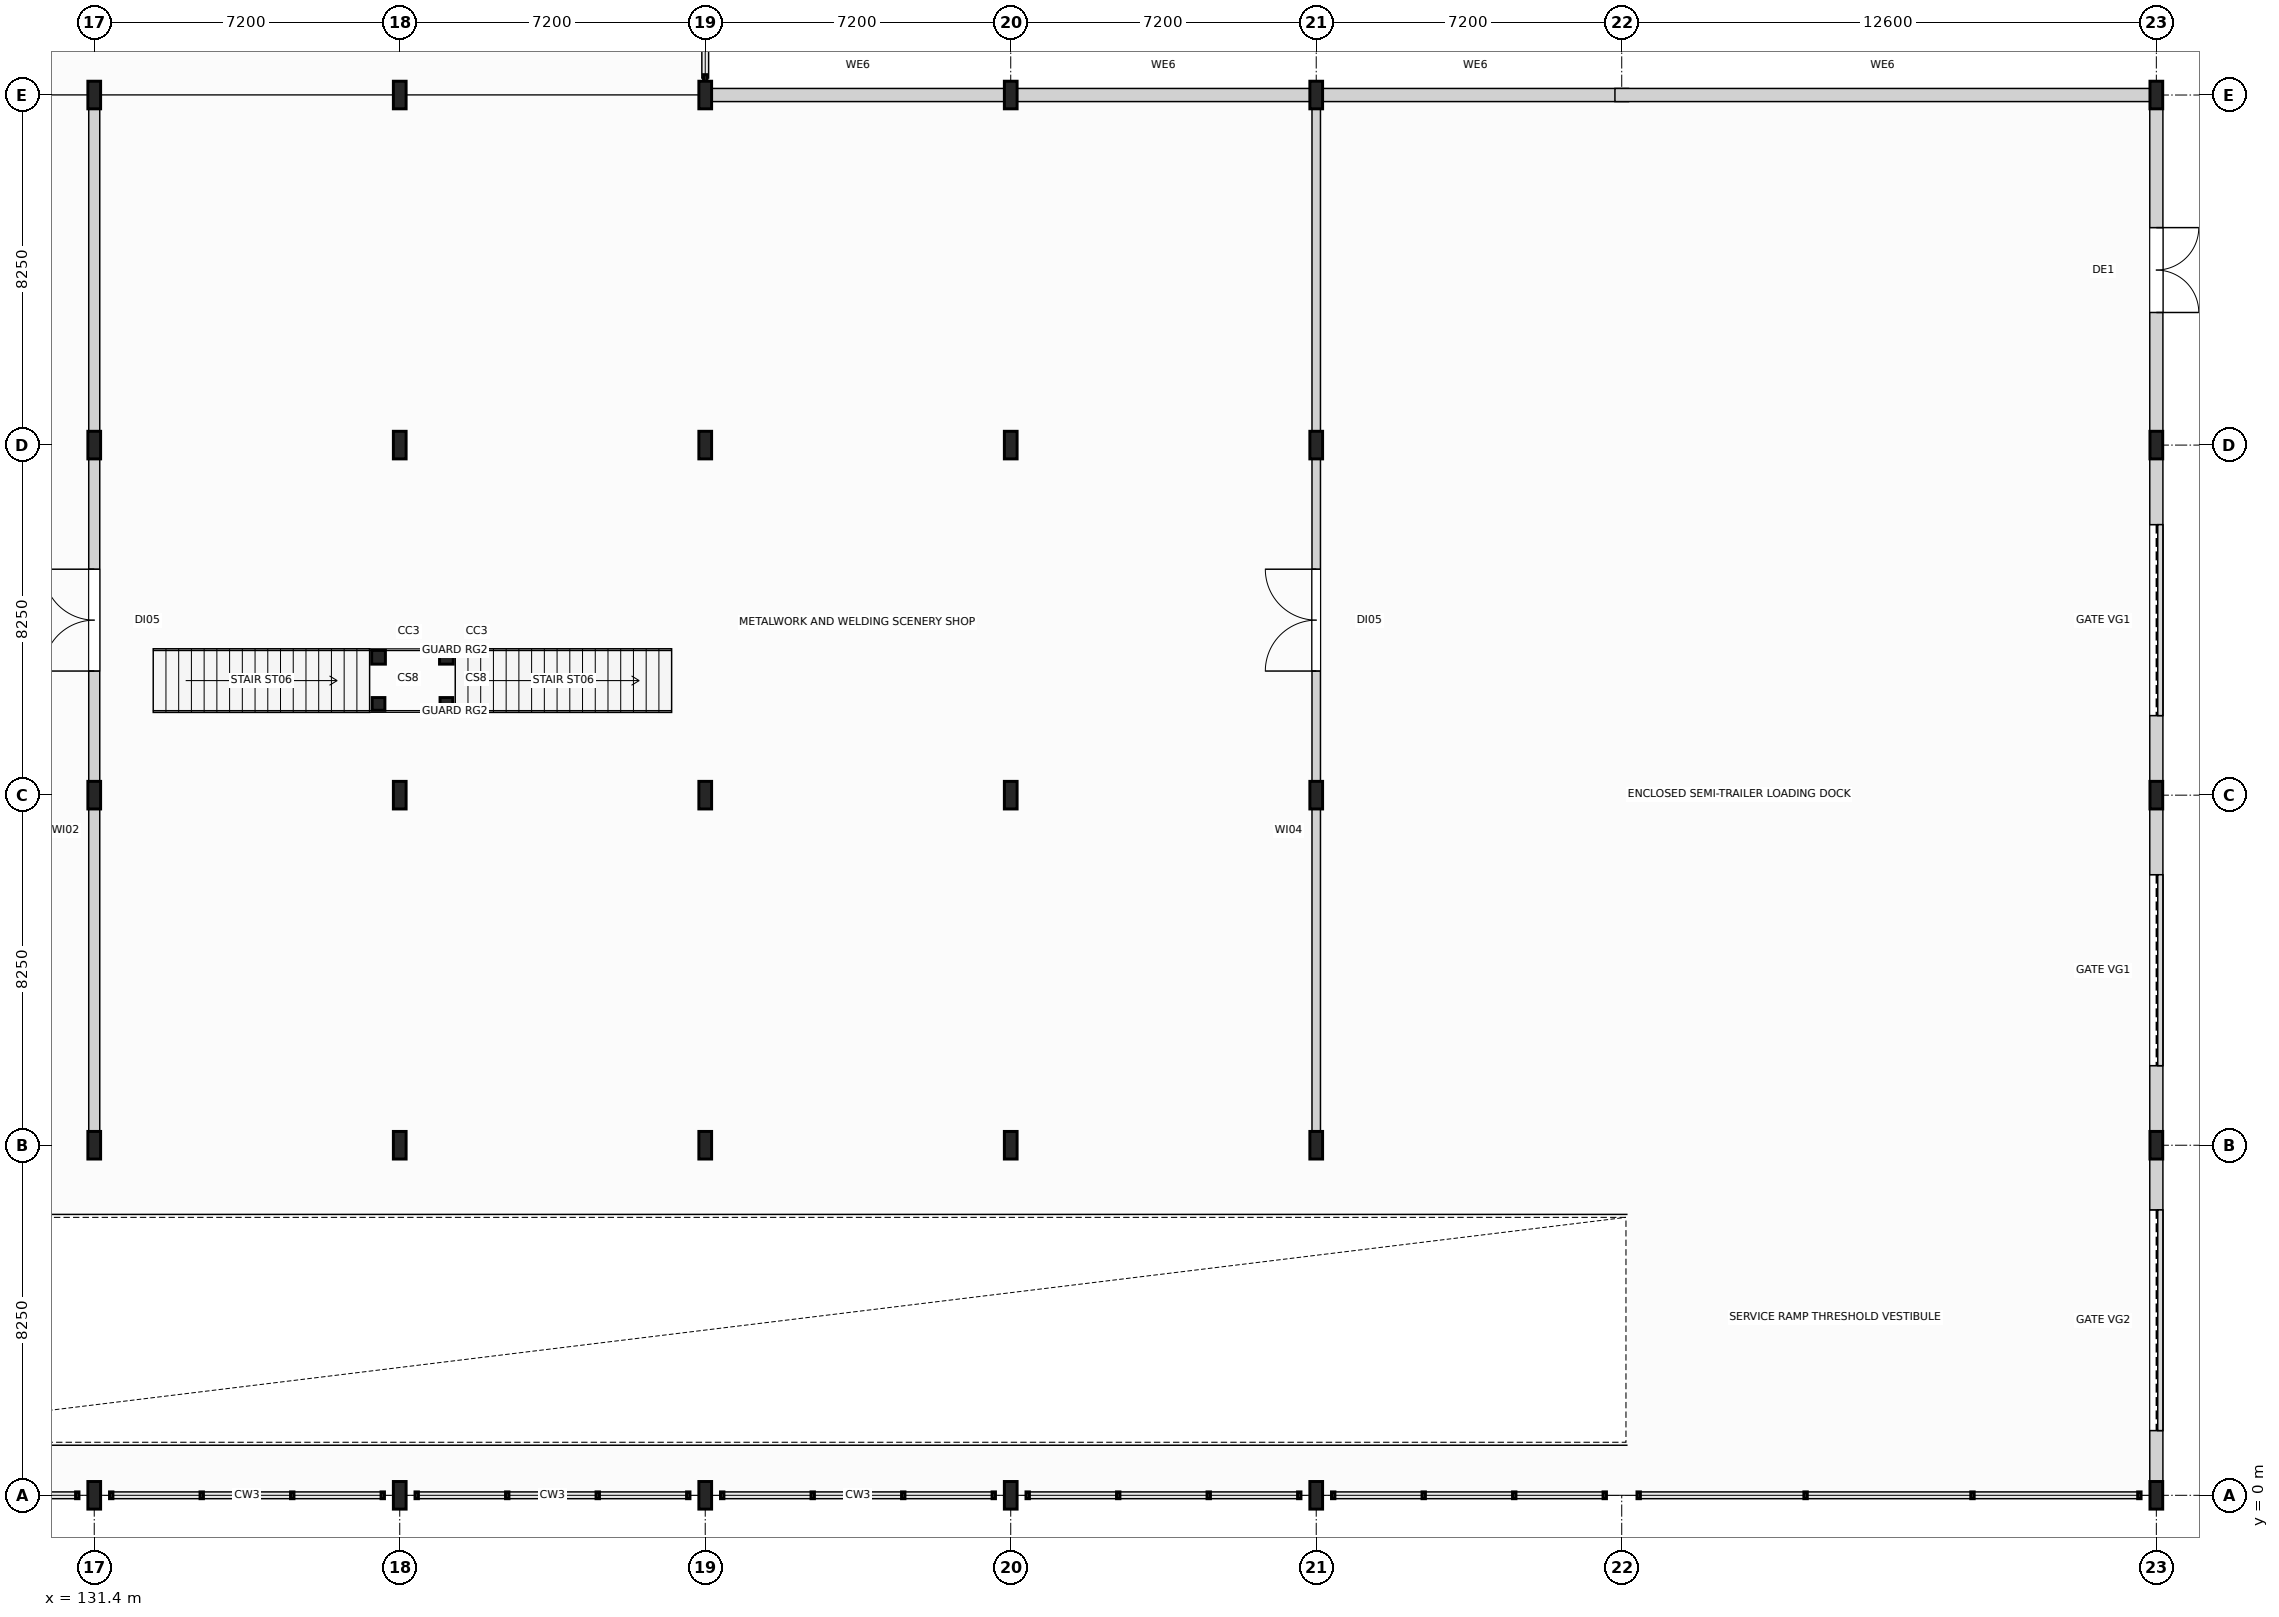
"""IFC4 building model, lengths in metres.
Left out: names, types, materials, properties, quantities, classifications, styles, units other than length and angle.
Written with IfcOpenShell. Run it as: python <this file> out.ifc"""

import sys

from ifc_helpers import new_model, si_unit, direction, frame, frame_2d, origin, origin_2d, place, context, subcontext, project, spatial, rectangle, hollow_circle, i_section, extrude, element, fill, save


model = new_model("IFC4")
c1 = context("Model", 3, precision=1e-05, world=origin(), true_north=direction((0.0, 1.0)))
c2 = subcontext(c1, "Body", "Model", "MODEL_VIEW")
j1 = project(units=[si_unit("LENGTHUNIT", "METRE"), si_unit("PLANEANGLEUNIT", "RADIAN")], contexts=[c1])
p1 = place(None, origin())
s1 = spatial("IfcSite", under=j1, at=p1, CompositionType="ELEMENT")
p2 = place(p1, origin())
s2 = spatial("IfcBuilding", under=s1, at=p2, CompositionType="ELEMENT")
p3 = place(p2, origin())
s3 = spatial("IfcBuildingStorey", under=s2, at=p3, CompositionType="ELEMENT", Elevation=0.0)
for number, where, z_axis, x_axis in (
    (1, (131.4, 0.0, 0.0), (0.0, 0.0, 1.0), (1.0, 0.0, 0.0)),
    (2, (131.4, 8.25, 0.0), (0.0, 0.0, 1.0), (1.0, 0.0, 0.0)),
    (3, (131.4, 16.5, 0.0), (0.0, 0.0, 1.0), (1.0, 0.0, 0.0)),
    (4, (131.4, 24.75, 0.0), (0.0, 0.0, 1.0), (1.0, 0.0, 0.0)),
    (5, (131.4, 33.0, 0.0), (0.0, 0.0, 1.0), (1.0, 0.0, 0.0)),
    (6, (138.6, 0.0, 0.0), (0.0, 0.0, 1.0), (1.0, 0.0, 0.0)),
    (7, (138.6, 8.25, 0.0), (0.0, 0.0, 1.0), (1.0, 0.0, 0.0)),
    (8, (138.6, 16.5, 0.0), (0.0, 0.0, 1.0), (1.0, 0.0, 0.0)),
    (9, (138.6, 24.75, 0.0), (0.0, 0.0, 1.0), (1.0, 0.0, 0.0)),
    (10, (138.6, 33.0, 0.0), (0.0, 0.0, 1.0), (1.0, 0.0, 0.0)),
    (11, (145.8, 0.0, 0.0), (0.0, 0.0, 1.0), (1.0, 0.0, 0.0)),
    (12, (145.8, 8.25, 0.0), (0.0, 0.0, 1.0), (1.0, 0.0, 0.0)),
    (13, (145.8, 16.5, 0.0), (0.0, 0.0, 1.0), (1.0, 0.0, 0.0)),
    (14, (145.8, 24.75, 0.0), (0.0, 0.0, 1.0), (1.0, 0.0, 0.0)),
    (15, (145.8, 33.0, 0.0), (0.0, 0.0, 1.0), (1.0, 0.0, 0.0)),
    (16, (153.0, 0.0, 0.0), (0.0, 0.0, 1.0), (1.0, 0.0, 0.0)),
    (17, (153.0, 8.25, 0.0), (0.0, 0.0, 1.0), (1.0, 0.0, 0.0)),
    (18, (153.0, 16.5, 0.0), (0.0, 0.0, 1.0), (1.0, 0.0, 0.0)),
    (19, (153.0, 24.75, 0.0), (0.0, 0.0, 1.0), (1.0, 0.0, 0.0)),
    (20, (153.0, 33.0, 0.0), (0.0, 0.0, 1.0), (1.0, 0.0, 0.0)),
    (21, (160.2, 0.0, 0.0), (0.0, 0.0, 1.0), (1.0, 0.0, 0.0)),
    (22, (160.2, 8.25, 0.0), (0.0, 0.0, 1.0), (1.0, 0.0, 0.0)),
    (23, (160.2, 16.5, 0.0), (0.0, 0.0, 1.0), (1.0, 0.0, 0.0)),
    (24, (160.2, 24.75, 0.0), (0.0, 0.0, 1.0), (1.0, 0.0, 0.0)),
    (25, (160.2, 33.0, 0.0), (0.0, 0.0, 1.0), (1.0, 0.0, 0.0)),
    (26, (180.0, 0.0, 0.0), (0.0, 0.0, 1.0), (1.0, 0.0, 0.0)),
    (27, (180.0, 8.25, 0.0), (0.0, 0.0, 1.0), (1.0, 0.0, 0.0)),
    (28, (180.0, 16.5, 0.0), (0.0, 0.0, 1.0), (1.0, 0.0, 0.0)),
    (29, (180.0, 24.75, 0.0), (0.0, 0.0, 1.0), (1.0, 0.0, 0.0)),
    (30, (180.0, 33.0, 0.0), (0.0, 0.0, 1.0), (1.0, 0.0, 0.0)),
):
    element("IfcColumn", number, at=place(p3, frame(where, z_axis=z_axis, x_axis=x_axis)), inside=s3, PredefinedType="COLUMN", context=c2, shape_type="SweptSolid", body=[
        extrude(i_section(OverallWidth=0.3, OverallDepth=0.65, WebThickness=0.016, FlangeThickness=0.031, at=origin_2d()), origin(), (0.0, 0.0, 1.0), 6.0),
    ])
p4 = place(p3, frame((180.0, 7.93, 0.0), z_axis=(0.0, 0.0, 1.0), x_axis=(0.0, -1.0, 0.0)))
e31 = element("IfcWall", 31, at=p4, inside=s3, PredefinedType="SOLIDWALL", context=c2, shape_type="SweptSolid", body=[
    extrude(rectangle(XDim=7.61, YDim=0.31, at=frame_2d((3.805, 0.0))), origin(), (0.0, 0.0, 1.0), 4.77),
])
p5 = place(p4, frame((1.205, 0.0, 0.0)))
e32 = element("IfcOpeningElement", 32, at=p5, cuts=e31, PredefinedType="OPENING", context=c2, shape_type="SweptSolid", body=[
    extrude(rectangle(XDim=5.2, YDim=4.5, at=frame_2d((2.6, 2.25))), frame((0.0, 0.165, 0.0), z_axis=(0.0, -1.0, 0.0), x_axis=(1.0, 0.0, 0.0)), (0.0, 0.0, 1.0), 0.33),
])
p6 = place(p3, frame((180.0, 16.18, 0.0), z_axis=(0.0, 0.0, 1.0), x_axis=(0.0, -1.0, 0.0)))
e33 = element("IfcWall", 33, at=p6, inside=s3, PredefinedType="SOLIDWALL", context=c2, shape_type="SweptSolid", body=[
    extrude(rectangle(XDim=7.61, YDim=0.31, at=frame_2d((3.805, 0.0))), origin(), (0.0, 0.0, 1.0), 4.77),
])
p7 = place(p6, frame((1.555, 0.0, 0.0)))
e34 = element("IfcOpeningElement", 34, at=p7, cuts=e33, PredefinedType="OPENING", context=c2, shape_type="SweptSolid", body=[
    extrude(rectangle(XDim=4.5, YDim=4.55, at=frame_2d((2.25, 2.275))), frame((0.0, 0.165, 0.0), z_axis=(0.0, -1.0, 0.0), x_axis=(1.0, 0.0, 0.0)), (0.0, 0.0, 1.0), 0.33),
])
p8 = place(p3, frame((180.0, 24.43, 0.0), z_axis=(0.0, 0.0, 1.0), x_axis=(0.0, -1.0, 0.0)))
e35 = element("IfcWall", 35, at=p8, inside=s3, PredefinedType="SOLIDWALL", context=c2, shape_type="SweptSolid", body=[
    extrude(rectangle(XDim=7.61, YDim=0.31, at=frame_2d((3.805, 0.0))), origin(), (0.0, 0.0, 1.0), 4.77),
])
p9 = place(p8, frame((1.555, 0.0, 0.0)))
e36 = element("IfcOpeningElement", 36, at=p9, cuts=e35, PredefinedType="OPENING", context=c2, shape_type="SweptSolid", body=[
    extrude(rectangle(XDim=4.5, YDim=4.55, at=frame_2d((2.25, 2.275))), frame((0.0, 0.165, 0.0), z_axis=(0.0, -1.0, 0.0), x_axis=(1.0, 0.0, 0.0)), (0.0, 0.0, 1.0), 0.33),
])
p10 = place(p3, frame((180.0, 32.68, 0.0), z_axis=(0.0, 0.0, 1.0), x_axis=(0.0, -1.0, 0.0)))
e37 = element("IfcWall", 37, at=p10, inside=s3, PredefinedType="SOLIDWALL", context=c2, shape_type="SweptSolid", body=[
    extrude(rectangle(XDim=7.61, YDim=0.31, at=frame_2d((3.805, 0.0))), origin(), (0.0, 0.0, 1.0), 4.79),
])
p11 = place(p10, frame((2.805, 0.0, 0.0)))
e38 = element("IfcOpeningElement", 38, at=p11, cuts=e37, PredefinedType="OPENING", context=c2, shape_type="SweptSolid", body=[
    extrude(rectangle(XDim=2.0, YDim=2.4, at=frame_2d((1.0, 1.2))), frame((0.0, 0.165, 0.0), z_axis=(0.0, -1.0, 0.0), x_axis=(1.0, 0.0, 0.0)), (0.0, 0.0, 1.0), 0.33),
])
for number, where, z_axis, x_axis in (
    (39, (145.945, 33.0, 0.0), (0.0, 0.0, 1.0), (1.0, 0.0, 0.0)),
    (40, (153.145, 33.0, 0.0), (0.0, 0.0, 1.0), (1.0, 0.0, 0.0)),
):
    element("IfcWall", number, at=place(p3, frame(where, z_axis=z_axis, x_axis=x_axis)), inside=s3, PredefinedType="SOLIDWALL", context=c2, shape_type="SweptSolid", body=[
        extrude(rectangle(XDim=6.91, YDim=0.31, at=frame_2d((3.455, 0.0))), origin(), (0.0, 0.0, 1.0), 5.065),
    ])
p12 = place(p3, frame((160.345, 33.0, 0.0), z_axis=(0.0, 0.0, 1.0), x_axis=(1.0, 0.0, 0.0)))
e41 = element("IfcWall", 41, at=p12, inside=s3, PredefinedType="SOLIDWALL", context=c2, shape_type="SweptSolid", body=[
    extrude(rectangle(XDim=7.215, YDim=0.31, at=frame_2d((3.607, 0.0))), origin(), (0.0, 0.0, 1.0), 5.065),
])
p13 = place(p3, frame((167.24, 33.0, 0.0), z_axis=(0.0, 0.0, 1.0), x_axis=(1.0, 0.0, 0.0)))
e42 = element("IfcWall", 42, at=p13, inside=s3, PredefinedType="SOLIDWALL", context=c2, shape_type="SweptSolid", body=[
    extrude(rectangle(XDim=12.615, YDim=0.31, at=frame_2d((6.308, 0.0))), origin(), (0.0, 0.0, 1.0), 4.79),
])
for number, where, z_axis, x_axis in (
    (43, (138.1, 18.65, 0.0), (0.0, 0.0, 1.0), (1.0, 0.0, 0.0)),
    (44, (139.7, 18.65, 0.0), (0.0, 0.0, 1.0), (1.0, 0.0, 0.0)),
):
    element("IfcColumn", number, at=place(p3, frame(where, z_axis=z_axis, x_axis=x_axis)), inside=s3, PredefinedType="COLUMN", context=c2, shape_type="SweptSolid", body=[
        extrude(i_section(OverallWidth=0.3, OverallDepth=0.3, WebThickness=0.011, FlangeThickness=0.019, at=origin_2d()), origin(), (0.0, 0.0, 1.0), 2.78),
    ])
for number, where, z_axis, x_axis in (
    (45, (138.1, 19.75, 0.0), (0.0, 0.0, 1.0), (1.0, 0.0, 0.0)),
    (46, (139.7, 19.75, 0.0), (0.0, 0.0, 1.0), (1.0, 0.0, 0.0)),
):
    element("IfcColumn", number, at=place(p3, frame(where, z_axis=z_axis, x_axis=x_axis)), inside=s3, PredefinedType="COLUMN", context=c2, shape_type="SweptSolid", body=[
        extrude(hollow_circle(Radius=0.162, WallThickness=0.016, at=origin_2d()), origin(), (0.0, 0.0, 1.0), 2.78),
    ])
p14 = place(p3, frame((131.4, 8.25, 0.0), z_axis=(0.0, 0.0, 1.0), x_axis=(0.0, 1.0, 0.0)))
e47 = element("IfcWall", 47, at=p14, inside=s3, PredefinedType="PARTITIONING", context=c2, shape_type="SweptSolid", body=[
    extrude(rectangle(XDim=24.75, YDim=0.26, at=frame_2d((12.375, 0.0))), origin(), (0.0, 0.0, 1.0), 4.915),
])
p15 = place(p14, frame((11.175, 0.0, 0.0)))
e48 = element("IfcOpeningElement", 48, at=p15, cuts=e47, PredefinedType="OPENING", context=c2, shape_type="SweptSolid", body=[
    extrude(rectangle(XDim=2.4, YDim=2.65, at=frame_2d((1.2, 1.325))), frame((0.0, 0.14, 0.0), z_axis=(0.0, -1.0, 0.0), x_axis=(1.0, 0.0, 0.0)), (0.0, 0.0, 1.0), 0.28),
])
p16 = place(p3, frame((160.2, 8.25, 0.0), z_axis=(0.0, 0.0, 1.0), x_axis=(0.0, 1.0, 0.0)))
e49 = element("IfcWall", 49, at=p16, inside=s3, PredefinedType="PARTITIONING", context=c2, shape_type="SweptSolid", body=[
    extrude(rectangle(XDim=24.75, YDim=0.2, at=frame_2d((12.375, 0.0))), origin(), (0.0, 0.0, 1.0), 4.965),
])
p17 = place(p16, frame((11.175, 0.0, 0.0)))
e50 = element("IfcOpeningElement", 50, at=p17, cuts=e49, PredefinedType="OPENING", context=c2, shape_type="SweptSolid", body=[
    extrude(rectangle(XDim=2.4, YDim=2.65, at=frame_2d((1.2, 1.325))), frame((0.0, 0.11, 0.0), z_axis=(0.0, -1.0, 0.0), x_axis=(1.0, 0.0, 0.0)), (0.0, 0.0, 1.0), 0.22),
])
p18 = place(p11, origin())
e51 = element("IfcDoor", 51, at=p18, inside=s3, OperationType="DOUBLE_DOOR_SINGLE_SWING", PredefinedType="DOOR", context=c2, shape_type="SweptSolid", body=[
    extrude(rectangle(XDim=2.0, YDim=2.4, at=frame_2d((1.0, 1.2))), frame((0.0, 0.025, 0.0), z_axis=(0.0, -1.0, 0.0), x_axis=(1.0, 0.0, 0.0)), (0.0, 0.0, 1.0), 0.05),
])
fill(e38, e51)
p19 = place(p5, origin())
e52 = element("IfcDoor", 52, at=p19, inside=s3, OperationType="ROLLINGUP", PredefinedType="GATE", context=c2, shape_type="SweptSolid", body=[
    extrude(rectangle(XDim=5.2, YDim=4.5, at=frame_2d((2.6, 2.25))), frame((0.0, 0.025, 0.0), z_axis=(0.0, -1.0, 0.0), x_axis=(1.0, 0.0, 0.0)), (0.0, 0.0, 1.0), 0.05),
])
fill(e32, e52)
p20 = place(p7, origin())
e53 = element("IfcDoor", 53, at=p20, inside=s3, OperationType="ROLLINGUP", PredefinedType="GATE", context=c2, shape_type="SweptSolid", body=[
    extrude(rectangle(XDim=4.5, YDim=4.55, at=frame_2d((2.25, 2.275))), frame((0.0, 0.025, 0.0), z_axis=(0.0, -1.0, 0.0), x_axis=(1.0, 0.0, 0.0)), (0.0, 0.0, 1.0), 0.05),
])
fill(e34, e53)
p21 = place(p9, origin())
e54 = element("IfcDoor", 54, at=p21, inside=s3, OperationType="ROLLINGUP", PredefinedType="GATE", context=c2, shape_type="SweptSolid", body=[
    extrude(rectangle(XDim=4.5, YDim=4.55, at=frame_2d((2.25, 2.275))), frame((0.0, 0.025, 0.0), z_axis=(0.0, -1.0, 0.0), x_axis=(1.0, 0.0, 0.0)), (0.0, 0.0, 1.0), 0.05),
])
fill(e36, e54)
p22 = place(p15, origin())
e55 = element("IfcDoor", 55, at=p22, inside=s3, OperationType="DOUBLE_DOOR_SINGLE_SWING", PredefinedType="DOOR", context=c2, shape_type="SweptSolid", body=[
    extrude(rectangle(XDim=2.4, YDim=2.65, at=frame_2d((1.2, 1.325))), frame((0.0, 0.025, 0.0), z_axis=(0.0, -1.0, 0.0), x_axis=(1.0, 0.0, 0.0)), (0.0, 0.0, 1.0), 0.05),
])
fill(e48, e55)
p23 = place(p17, origin())
e56 = element("IfcDoor", 56, at=p23, inside=s3, OperationType="DOUBLE_DOOR_SINGLE_SWING", PredefinedType="DOOR", context=c2, shape_type="SweptSolid", body=[
    extrude(rectangle(XDim=2.4, YDim=2.65, at=frame_2d((1.2, 1.325))), frame((0.0, 0.025, 0.0), z_axis=(0.0, -1.0, 0.0), x_axis=(1.0, 0.0, 0.0)), (0.0, 0.0, 1.0), 0.05),
])
fill(e50, e56)
save(model, sys.argv[1])
